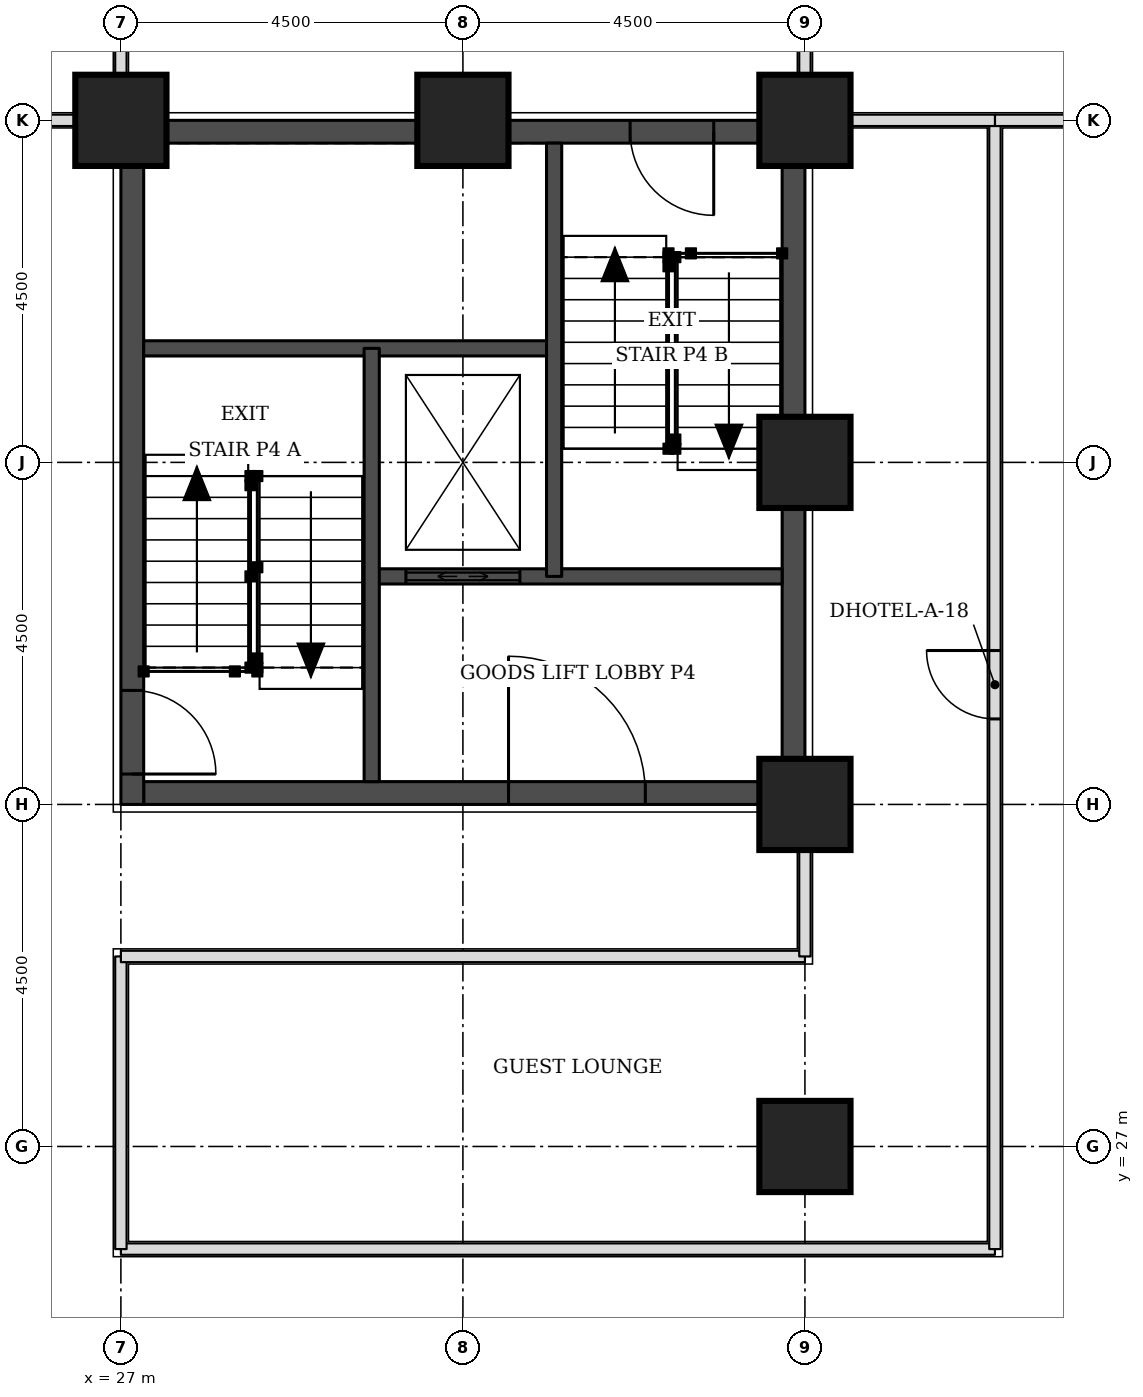
"""IFC4 building model, lengths in metres.
Left out: names, types, materials, properties, quantities, classifications, styles, units other than length and angle.
Written with IfcOpenShell. Run it as: python <this file> out.ifc"""

import sys

from ifc_helpers import new_model, si_unit, direction, frame, frame_2d, origin, origin_2d, place, context, subcontext, project, spatial, rectangle, extrude, element, fill, save


model = new_model("IFC4")
c1 = context("Model", 3, precision=1e-05, world=origin(), true_north=direction((0.0, 1.0)))
c2 = subcontext(c1, "Body", "Model", "MODEL_VIEW")
j1 = project(units=[si_unit("LENGTHUNIT", "METRE"), si_unit("PLANEANGLEUNIT", "RADIAN")], contexts=[c1])
p1 = place(None, origin())
s1 = spatial("IfcSite", under=j1, at=p1, CompositionType="ELEMENT")
p2 = place(p1, origin())
s2 = spatial("IfcBuilding", under=s1, at=p2, CompositionType="ELEMENT")
p3 = place(p2, frame((0.0, 0.0, 26.4)))
s3 = spatial("IfcBuildingStorey", under=s2, at=p3, CompositionType="ELEMENT", Elevation=26.4)
for number, where, z_axis, x_axis in (
    (1, (36.0, 27.0, 0.0), (0.0, 0.0, 1.0), (1.0, 0.0, 0.0)),
    (2, (36.0, 31.5, 0.0), (0.0, 0.0, 1.0), (1.0, 0.0, 0.0)),
    (3, (36.0, 36.0, 0.0), (0.0, 0.0, 1.0), (1.0, 0.0, 0.0)),
    (4, (27.0, 40.5, 0.0), (0.0, 0.0, 1.0), (1.0, 0.0, 0.0)),
    (5, (31.5, 40.5, 0.0), (0.0, 0.0, 1.0), (1.0, 0.0, 0.0)),
    (6, (36.0, 40.5, 0.0), (0.0, 0.0, 1.0), (1.0, 0.0, 0.0)),
):
    element("IfcColumn", number, at=place(p3, frame(where, z_axis=z_axis, x_axis=x_axis)), inside=s3, PredefinedType="COLUMN", context=c2, shape_type="SweptSolid", body=[
        extrude(rectangle(XDim=1.2, YDim=1.2, at=origin_2d()), origin(), (0.0, 0.0, 1.0), 3.3),
    ])
p4 = place(p3, frame((27.3, 31.65, 0.0), z_axis=(0.0, 0.0, 1.0), x_axis=(1.0, 0.0, 0.0)))
e7 = element("IfcWall", 7, at=p4, inside=s3, PredefinedType="SHEAR", context=c2, shape_type="SweptSolid", body=[
    extrude(rectangle(XDim=8.4, YDim=0.3, at=frame_2d((4.2, 0.0))), origin(), (0.0, 0.0, 1.0), 3.3),
])
p5 = place(p4, frame((4.8, 0.0, 0.0)))
e8 = element("IfcOpeningElement", 8, at=p5, cuts=e7, PredefinedType="OPENING", context=c2, shape_type="SweptSolid", body=[
    extrude(rectangle(XDim=1.8, YDim=2.1, at=frame_2d((0.9, 1.05))), frame((0.0, 0.16, 0.0), z_axis=(0.0, -1.0, 0.0), x_axis=(1.0, 0.0, 0.0)), (0.0, 0.0, 1.0), 0.32),
])
p6 = place(p3, frame((27.3, 40.35, 0.0), z_axis=(0.0, 0.0, 1.0), x_axis=(1.0, 0.0, 0.0)))
e9 = element("IfcWall", 9, at=p6, inside=s3, PredefinedType="SHEAR", context=c2, shape_type="SweptSolid", body=[
    extrude(rectangle(XDim=8.4, YDim=0.3, at=frame_2d((4.2, 0.0))), origin(), (0.0, 0.0, 1.0), 3.3),
])
p7 = place(p6, frame((6.4, 0.0, 0.0)))
e10 = element("IfcOpeningElement", 10, at=p7, cuts=e9, PredefinedType="OPENING", context=c2, shape_type="SweptSolid", body=[
    extrude(rectangle(XDim=1.1, YDim=2.1, at=frame_2d((0.55, 1.05))), frame((0.0, 0.16, 0.0), z_axis=(0.0, -1.0, 0.0), x_axis=(1.0, 0.0, 0.0)), (0.0, 0.0, 1.0), 0.32),
])
p8 = place(p3, frame((27.15, 31.5, 0.0), z_axis=(0.0, 0.0, 1.0), x_axis=(0.0, 1.0, 0.0)))
e11 = element("IfcWall", 11, at=p8, inside=s3, PredefinedType="SHEAR", context=c2, shape_type="SweptSolid", body=[
    extrude(rectangle(XDim=9.0, YDim=0.3, at=frame_2d((4.5, 0.0))), origin(), (0.0, 0.0, 1.0), 3.3),
])
p9 = place(p8, frame((0.4, 0.0, 0.0)))
e12 = element("IfcOpeningElement", 12, at=p9, cuts=e11, PredefinedType="OPENING", context=c2, shape_type="SweptSolid", body=[
    extrude(rectangle(XDim=1.1, YDim=2.1, at=frame_2d((0.55, 1.05))), frame((0.0, 0.16, 0.0), z_axis=(0.0, -1.0, 0.0), x_axis=(1.0, 0.0, 0.0)), (0.0, 0.0, 1.0), 0.32),
])
p10 = place(p3, frame((35.85, 31.5, 0.0), z_axis=(0.0, 0.0, 1.0), x_axis=(0.0, 1.0, 0.0)))
e13 = element("IfcWall", 13, at=p10, inside=s3, PredefinedType="SHEAR", context=c2, shape_type="SweptSolid", body=[
    extrude(rectangle(XDim=9.0, YDim=0.3, at=frame_2d((4.5, 0.0))), origin(), (0.0, 0.0, 1.0), 3.3),
])
p11 = place(p3, frame((27.0, 25.65, 0.0), z_axis=(0.0, 0.0, 1.0), x_axis=(1.0, 0.0, 0.0)))
e14 = element("IfcWall", 14, at=p11, inside=s3, PredefinedType="PARTITIONING", context=c2, shape_type="SweptSolid", body=[
    extrude(rectangle(XDim=11.5, YDim=0.15, at=frame_2d((5.75, 0.0))), origin(), (0.0, 0.0, 1.0), 3.08),
])
p12 = place(p3, frame((27.0, 25.65, 0.0), z_axis=(0.0, 0.0, 1.0), x_axis=(0.0, 1.0, 0.0)))
e15 = element("IfcWall", 15, at=p12, inside=s3, PredefinedType="PARTITIONING", context=c2, shape_type="SweptSolid", body=[
    extrude(rectangle(XDim=3.85, YDim=0.15, at=frame_2d((1.925, 0.0))), origin(), (0.0, 0.0, 1.0), 3.08),
])
p13 = place(p3, frame((38.5, 25.65, 0.0), z_axis=(0.0, 0.0, 1.0), x_axis=(0.0, 1.0, 0.0)))
e16 = element("IfcWall", 16, at=p13, inside=s3, PredefinedType="PARTITIONING", context=c2, shape_type="SweptSolid", body=[
    extrude(rectangle(XDim=14.85, YDim=0.15, at=frame_2d((7.425, 0.0))), origin(), (0.0, 0.0, 1.0), 3.08),
])
p14 = place(p13, frame((6.975, 0.0, 0.0)))
e17 = element("IfcOpeningElement", 17, at=p14, cuts=e16, PredefinedType="OPENING", context=c2, shape_type="SweptSolid", body=[
    extrude(rectangle(XDim=0.9, YDim=2.1, at=frame_2d((0.45, 1.05))), frame((0.0, 0.085, 0.0), z_axis=(0.0, -1.0, 0.0), x_axis=(1.0, 0.0, 0.0)), (0.0, 0.0, 1.0), 0.17),
])
p15 = place(p3, frame((27.0, 29.5, 0.0), z_axis=(0.0, 0.0, 1.0), x_axis=(1.0, 0.0, 0.0)))
e18 = element("IfcWall", 18, at=p15, inside=s3, PredefinedType="PARTITIONING", context=c2, shape_type="SweptSolid", body=[
    extrude(rectangle(XDim=9.0, YDim=0.15, at=frame_2d((4.5, 0.0))), origin(), (0.0, 0.0, 1.0), 3.08),
])
p16 = place(p3, frame((36.0, 29.5, 0.0), z_axis=(0.0, 0.0, 1.0), x_axis=(0.0, 1.0, 0.0)))
e19 = element("IfcWall", 19, at=p16, inside=s3, PredefinedType="PARTITIONING", context=c2, shape_type="SweptSolid", body=[
    extrude(rectangle(XDim=1.95, YDim=0.15, at=frame_2d((0.975, 0.0))), origin(), (0.0, 0.0, 1.0), 2.33),
])
p17 = place(p3, frame((24.6, 40.5, 0.0), z_axis=(0.0, 0.0, 1.0), x_axis=(1.0, 0.0, 0.0)))
e20 = element("IfcWall", 20, at=p17, inside=s3, PredefinedType="PARTITIONING", context=c2, shape_type="SweptSolid", body=[
    extrude(rectangle(XDim=2.35, YDim=0.15, at=frame_2d((1.175, 0.0))), origin(), (0.0, 0.0, 1.0), 2.33),
])
p18 = place(p3, frame((38.5, 40.5, 0.0), z_axis=(0.0, 0.0, 1.0), x_axis=(1.0, 0.0, 0.0)))
e21 = element("IfcWall", 21, at=p18, inside=s3, PredefinedType="PARTITIONING", context=c2, shape_type="SweptSolid", body=[
    extrude(rectangle(XDim=1.95, YDim=0.15, at=frame_2d((0.975, 0.0))), origin(), (0.0, 0.0, 1.0), 2.33),
])
p19 = place(p3, frame((27.0, 40.55, 0.0), z_axis=(0.0, 0.0, 1.0), x_axis=(0.0, 1.0, 0.0)))
e22 = element("IfcWall", 22, at=p19, inside=s3, PredefinedType="PARTITIONING", context=c2, shape_type="SweptSolid", body=[
    extrude(rectangle(XDim=2.45, YDim=0.15, at=frame_2d((1.225, 0.0))), origin(), (0.0, 0.0, 1.0), 3.08),
])
p20 = place(p3, frame((36.0, 40.55, 0.0), z_axis=(0.0, 0.0, 1.0), x_axis=(0.0, 1.0, 0.0)))
e23 = element("IfcWall", 23, at=p20, inside=s3, PredefinedType="PARTITIONING", context=c2, shape_type="SweptSolid", body=[
    extrude(rectangle(XDim=4.4, YDim=0.15, at=frame_2d((2.2, 0.0))), origin(), (0.0, 0.0, 1.0), 2.33),
])
p21 = place(p3, frame((36.05, 40.5, 0.0), z_axis=(0.0, 0.0, 1.0), x_axis=(1.0, 0.0, 0.0)))
e24 = element("IfcWall", 24, at=p21, inside=s3, PredefinedType="PARTITIONING", context=c2, shape_type="SweptSolid", body=[
    extrude(rectangle(XDim=2.45, YDim=0.15, at=frame_2d((1.225, 0.0))), origin(), (0.0, 0.0, 1.0), 2.33),
])
p22 = place(p3, frame((30.3, 34.5, 0.0), z_axis=(0.0, 0.0, 1.0), x_axis=(1.0, 0.0, 0.0)))
e25 = element("IfcWall", 25, at=p22, inside=s3, PredefinedType="SOLIDWALL", context=c2, shape_type="SweptSolid", body=[
    extrude(rectangle(XDim=5.4, YDim=0.2, at=frame_2d((2.7, 0.0))), origin(), (0.0, 0.0, 1.0), 3.08),
])
p23 = place(p22, frame((0.45, 0.0, 0.0)))
e26 = element("IfcOpeningElement", 26, at=p23, cuts=e25, PredefinedType="OPENING", context=c2, shape_type="SweptSolid", body=[
    extrude(rectangle(XDim=1.5, YDim=2.1, at=frame_2d((0.75, 1.05))), frame((0.0, 0.11, 0.0), z_axis=(0.0, -1.0, 0.0), x_axis=(1.0, 0.0, 0.0)), (0.0, 0.0, 1.0), 0.22),
])
p24 = place(p3, frame((27.3, 37.5, 0.0), z_axis=(0.0, 0.0, 1.0), x_axis=(1.0, 0.0, 0.0)))
e27 = element("IfcWall", 27, at=p24, inside=s3, PredefinedType="SOLIDWALL", context=c2, shape_type="SweptSolid", body=[
    extrude(rectangle(XDim=5.4, YDim=0.2, at=frame_2d((2.7, 0.0))), origin(), (0.0, 0.0, 1.0), 3.08),
])
for number, where, z_axis, x_axis in (
    (28, (30.3, 31.8, 0.0), (0.0, 0.0, 1.0), (0.0, 1.0, 0.0)),
    (29, (32.7, 34.5, 0.0), (0.0, 0.0, 1.0), (0.0, 1.0, 0.0)),
):
    element("IfcWall", number, at=place(p3, frame(where, z_axis=z_axis, x_axis=x_axis)), inside=s3, PredefinedType="SOLIDWALL", context=c2, shape_type="SweptSolid", body=[
        extrude(rectangle(XDim=5.7, YDim=0.2, at=frame_2d((2.85, 0.0))), origin(), (0.0, 0.0, 1.0), 3.08),
    ])
p25 = place(p14, origin())
e30 = element("IfcDoor", 30, at=p25, inside=s3, OperationType="SINGLE_SWING_RIGHT", PredefinedType="DOOR", context=c2, shape_type="SweptSolid", body=[
    extrude(rectangle(XDim=0.9, YDim=2.1, at=frame_2d((0.45, 1.05))), frame((0.0, 0.025, 0.0), z_axis=(0.0, -1.0, 0.0), x_axis=(1.0, 0.0, 0.0)), (0.0, 0.0, 1.0), 0.05),
])
fill(e17, e30)
p26 = place(p9, frame((1.1, 0.0, 0.0), z_axis=(0.0, 0.0, 1.0), x_axis=(-1.0, 0.0, 0.0)))
e31 = element("IfcDoor", 31, at=p26, inside=s3, OperationType="SINGLE_SWING_RIGHT", PredefinedType="DOOR", context=c2, shape_type="SweptSolid", body=[
    extrude(rectangle(XDim=1.1, YDim=2.1, at=frame_2d((0.55, 1.05))), frame((0.0, 0.025, 0.0), z_axis=(0.0, -1.0, 0.0), x_axis=(1.0, 0.0, 0.0)), (0.0, 0.0, 1.0), 0.05),
])
fill(e12, e31)
p27 = place(p7, frame((1.1, 0.0, 0.0), z_axis=(0.0, 0.0, 1.0), x_axis=(-1.0, 0.0, 0.0)))
e32 = element("IfcDoor", 32, at=p27, inside=s3, OperationType="SINGLE_SWING_LEFT", PredefinedType="DOOR", context=c2, shape_type="SweptSolid", body=[
    extrude(rectangle(XDim=1.1, YDim=2.1, at=frame_2d((0.55, 1.05))), frame((0.0, 0.025, 0.0), z_axis=(0.0, -1.0, 0.0), x_axis=(1.0, 0.0, 0.0)), (0.0, 0.0, 1.0), 0.05),
])
fill(e10, e32)
p28 = place(p23, origin())
e33 = element("IfcDoor", 33, at=p28, inside=s3, OperationType="DOUBLE_DOOR_SLIDING", PredefinedType="DOOR", context=c2, shape_type="SweptSolid", body=[
    extrude(rectangle(XDim=1.5, YDim=2.1, at=frame_2d((0.75, 1.05))), frame((0.0, 0.025, 0.0), z_axis=(0.0, -1.0, 0.0), x_axis=(1.0, 0.0, 0.0)), (0.0, 0.0, 1.0), 0.05),
])
fill(e26, e33)
p29 = place(p5, origin())
e34 = element("IfcDoor", 34, at=p29, inside=s3, OperationType="SINGLE_SWING_LEFT", PredefinedType="DOOR", context=c2, shape_type="SweptSolid", body=[
    extrude(rectangle(XDim=1.8, YDim=2.1, at=frame_2d((0.9, 1.05))), frame((0.0, 0.025, 0.0), z_axis=(0.0, -1.0, 0.0), x_axis=(1.0, 0.0, 0.0)), (0.0, 0.0, 1.0), 0.05),
])
fill(e8, e34)
save(model, sys.argv[1])
